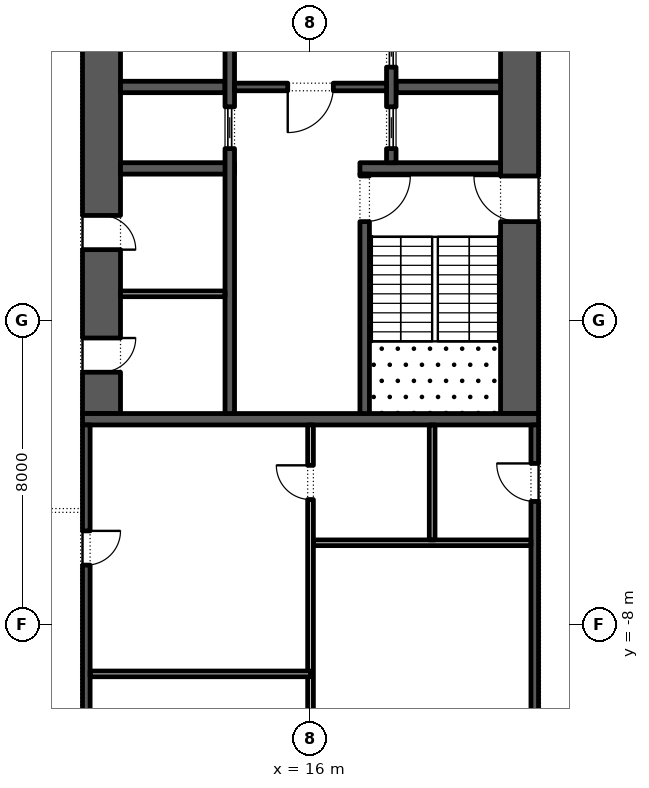
"""IFC4 building model, lengths in metres.
Left out: names, types, materials, properties, quantities, classifications, styles, units other than length and angle.
Written with IfcOpenShell. Run it as: python <this file> out.ifc"""

import sys

from ifc_helpers import new_model, si_unit, direction, frame, frame_2d, origin, place, context, subcontext, project, spatial, rectangle, extrude, element, fill, save


model = new_model("IFC4")
c1 = context("Model", 3, precision=1e-05, world=origin(), true_north=direction((0.0, 1.0)))
c2 = subcontext(c1, "Body", "Model", "MODEL_VIEW")
j1 = project(units=[si_unit("LENGTHUNIT", "METRE"), si_unit("PLANEANGLEUNIT", "RADIAN")], contexts=[c1])
p1 = place(None, origin())
s1 = spatial("IfcSite", under=j1, at=p1, CompositionType="ELEMENT")
p2 = place(p1, origin())
s2 = spatial("IfcBuilding", under=s1, at=p2, CompositionType="ELEMENT")
p3 = place(p2, frame((0.0, 0.0, 85.8)))
s3 = spatial("IfcBuildingStorey", under=s2, at=p3, CompositionType="ELEMENT", Elevation=85.8)
p4 = place(p3, frame((21.5, -2.45, 0.0), z_axis=(0.0, 0.0, 1.0), x_axis=(0.0, 1.0, 0.0)))
e1 = element("IfcWall", 1, at=p4, inside=s3, PredefinedType="SHEAR", context=c2, shape_type="SweptSolid", body=[
    extrude(rectangle(XDim=27.9, YDim=1.0, at=frame_2d((13.95, 0.0))), origin(), (0.0, 0.0, 1.0), 3.95),
])
p5 = place(p4, frame((5.05, 0.0, 0.0)))
e2 = element("IfcOpeningElement", 2, at=p5, cuts=e1, PredefinedType="OPENING", context=c2, shape_type="SweptSolid", body=[
    extrude(rectangle(XDim=1.2, YDim=2.1, at=frame_2d((0.6, 1.05))), frame((0.0, 0.51, 0.0), z_axis=(0.0, -1.0, 0.0), x_axis=(1.0, 0.0, 0.0)), (0.0, 0.0, 1.0), 1.02),
])
p6 = place(p4, frame((21.65, 0.0, 0.0)))
e3 = element("IfcOpeningElement", 3, at=p6, cuts=e1, PredefinedType="OPENING", context=c2, shape_type="SweptSolid", body=[
    extrude(rectangle(XDim=1.2, YDim=2.1, at=frame_2d((0.6, 1.05))), frame((0.0, 0.51, 0.0), z_axis=(0.0, -1.0, 0.0), x_axis=(1.0, 0.0, 0.0)), (0.0, 0.0, 1.0), 1.02),
])
p7 = place(p3, frame((10.5, -2.45, 0.0), z_axis=(0.0, 0.0, 1.0), x_axis=(0.0, 1.0, 0.0)))
e4 = element("IfcWall", 4, at=p7, inside=s3, PredefinedType="SHEAR", context=c2, shape_type="SweptSolid", body=[
    extrude(rectangle(XDim=27.9, YDim=1.0, at=frame_2d((13.95, 0.0))), origin(), (0.0, 0.0, 1.0), 3.95),
])
p8 = place(p7, frame((23.65, 0.0, 0.0)))
e5 = element("IfcOpeningElement", 5, at=p8, cuts=e4, PredefinedType="OPENING", context=c2, shape_type="SweptSolid", body=[
    extrude(rectangle(XDim=2.4, YDim=2.1, at=frame_2d((1.2, 1.05))), frame((0.0, 0.51, 0.0), z_axis=(0.0, -1.0, 0.0), x_axis=(1.0, 0.0, 0.0)), (0.0, 0.0, 1.0), 1.02),
])
p9 = place(p7, frame((1.087, 0.0, 0.0)))
e6 = element("IfcOpeningElement", 6, at=p9, cuts=e4, PredefinedType="OPENING", context=c2, shape_type="SweptSolid", body=[
    extrude(rectangle(XDim=0.9, YDim=2.1, at=frame_2d((0.45, 1.05))), frame((0.0, 0.51, 0.0), z_axis=(0.0, -1.0, 0.0), x_axis=(1.0, 0.0, 0.0)), (0.0, 0.0, 1.0), 1.02),
])
p10 = place(p7, frame((4.312, 0.0, 0.0)))
e7 = element("IfcOpeningElement", 7, at=p10, cuts=e4, PredefinedType="OPENING", context=c2, shape_type="SweptSolid", body=[
    extrude(rectangle(XDim=0.9, YDim=2.1, at=frame_2d((0.45, 1.05))), frame((0.0, 0.51, 0.0), z_axis=(0.0, -1.0, 0.0), x_axis=(1.0, 0.0, 0.0)), (0.0, 0.0, 1.0), 1.02),
])
p11 = place(p3, frame((10.0, -2.6, 0.0), z_axis=(0.0, 0.0, 1.0), x_axis=(1.0, 0.0, 0.0)))
e8 = element("IfcWall", 8, at=p11, inside=s3, PredefinedType="SHEAR", context=c2, shape_type="SweptSolid", body=[
    extrude(rectangle(XDim=12.0, YDim=0.3, at=frame_2d((6.0, 0.0))), origin(), (0.0, 0.0, 1.0), 3.95),
])
p12 = place(p3, frame((17.3, 4.0, 0.0), z_axis=(0.0, 0.0, 1.0), x_axis=(1.0, 0.0, 0.0)))
e9 = element("IfcWall", 9, at=p12, inside=s3, PredefinedType="SHEAR", context=c2, shape_type="SweptSolid", body=[
    extrude(rectangle(XDim=3.7, YDim=0.3, at=frame_2d((1.85, 0.0))), origin(), (0.0, 0.0, 1.0), 3.95),
])
p13 = place(p3, frame((17.425, -2.45, 0.0), z_axis=(0.0, 0.0, 1.0), x_axis=(0.0, 1.0, 0.0)))
e10 = element("IfcWall", 10, at=p13, inside=s3, PredefinedType="SHEAR", context=c2, shape_type="SweptSolid", body=[
    extrude(rectangle(XDim=6.3, YDim=0.25, at=frame_2d((3.15, 0.0))), origin(), (0.0, 0.0, 1.0), 3.95),
])
p14 = place(p13, frame((5.05, 0.0, 0.0)))
e11 = element("IfcOpeningElement", 11, at=p14, cuts=e10, PredefinedType="OPENING", context=c2, shape_type="SweptSolid", body=[
    extrude(rectangle(XDim=1.2, YDim=2.1, at=frame_2d((0.6, 1.05))), frame((0.0, 0.135, 0.0), z_axis=(0.0, -1.0, 0.0), x_axis=(1.0, 0.0, 0.0)), (0.0, 0.0, 1.0), 0.27),
])
p15 = place(p3, frame((18.25, 6.143, 0.0), z_axis=(0.0, 0.0, 1.0), x_axis=(1.0, 0.0, 0.0)))
e12 = element("IfcWall", 12, at=p15, inside=s3, PredefinedType="SHEAR", context=c2, shape_type="SweptSolid", body=[
    extrude(rectangle(XDim=2.75, YDim=0.3, at=frame_2d((1.375, 0.0))), origin(), (0.0, 0.0, 1.0), 3.95),
])
p16 = place(p3, frame((18.125, 4.15, 0.0), z_axis=(0.0, 0.0, 1.0), x_axis=(0.0, 1.0, 0.0)))
e13 = element("IfcWall", 13, at=p16, inside=s3, PredefinedType="SHEAR", context=c2, shape_type="SweptSolid", body=[
    extrude(rectangle(XDim=14.7, YDim=0.25, at=frame_2d((7.35, 0.0))), origin(), (0.0, 0.0, 1.0), 3.95),
])
p17 = place(p16, frame((0.371, 0.0, 0.0)))
e14 = element("IfcOpeningElement", 14, at=p17, cuts=e13, PredefinedType="OPENING", context=c2, shape_type="SweptSolid", body=[
    extrude(rectangle(XDim=1.1, YDim=2.1, at=frame_2d((0.55, 1.05))), frame((0.0, 0.135, 0.0), z_axis=(0.0, -1.0, 0.0), x_axis=(1.0, 0.0, 0.0)), (0.0, 0.0, 1.0), 0.27),
])
p18 = place(p16, frame((2.514, 0.0, 0.0)))
e15 = element("IfcOpeningElement", 15, at=p18, cuts=e13, PredefinedType="OPENING", context=c2, shape_type="SweptSolid", body=[
    extrude(rectangle(XDim=1.1, YDim=2.1, at=frame_2d((0.55, 1.05))), frame((0.0, 0.135, 0.0), z_axis=(0.0, -1.0, 0.0), x_axis=(1.0, 0.0, 0.0)), (0.0, 0.0, 1.0), 0.27),
])
p19 = place(p16, frame((4.657, 0.0, 0.0)))
e16 = element("IfcOpeningElement", 16, at=p19, cuts=e13, PredefinedType="OPENING", context=c2, shape_type="SweptSolid", body=[
    extrude(rectangle(XDim=1.1, YDim=2.1, at=frame_2d((0.55, 1.05))), frame((0.0, 0.135, 0.0), z_axis=(0.0, -1.0, 0.0), x_axis=(1.0, 0.0, 0.0)), (0.0, 0.0, 1.0), 0.27),
])
p20 = place(p16, frame((6.8, 0.0, 0.0)))
e17 = element("IfcOpeningElement", 17, at=p20, cuts=e13, PredefinedType="OPENING", context=c2, shape_type="SweptSolid", body=[
    extrude(rectangle(XDim=1.1, YDim=2.1, at=frame_2d((0.55, 1.05))), frame((0.0, 0.135, 0.0), z_axis=(0.0, -1.0, 0.0), x_axis=(1.0, 0.0, 0.0)), (0.0, 0.0, 1.0), 0.27),
])
p21 = place(p16, frame((8.943, 0.0, 0.0)))
e18 = element("IfcOpeningElement", 18, at=p21, cuts=e13, PredefinedType="OPENING", context=c2, shape_type="SweptSolid", body=[
    extrude(rectangle(XDim=1.1, YDim=2.1, at=frame_2d((0.55, 1.05))), frame((0.0, 0.135, 0.0), z_axis=(0.0, -1.0, 0.0), x_axis=(1.0, 0.0, 0.0)), (0.0, 0.0, 1.0), 0.27),
])
p22 = place(p16, frame((11.086, 0.0, 0.0)))
e19 = element("IfcOpeningElement", 19, at=p22, cuts=e13, PredefinedType="OPENING", context=c2, shape_type="SweptSolid", body=[
    extrude(rectangle(XDim=1.1, YDim=2.1, at=frame_2d((0.55, 1.05))), frame((0.0, 0.135, 0.0), z_axis=(0.0, -1.0, 0.0), x_axis=(1.0, 0.0, 0.0)), (0.0, 0.0, 1.0), 0.27),
])
p23 = place(p16, frame((13.229, 0.0, 0.0)))
e20 = element("IfcOpeningElement", 20, at=p23, cuts=e13, PredefinedType="OPENING", context=c2, shape_type="SweptSolid", body=[
    extrude(rectangle(XDim=1.1, YDim=2.1, at=frame_2d((0.55, 1.05))), frame((0.0, 0.135, 0.0), z_axis=(0.0, -1.0, 0.0), x_axis=(1.0, 0.0, 0.0)), (0.0, 0.0, 1.0), 0.27),
])
p24 = place(p3, frame((11.0, 4.0, 0.0), z_axis=(0.0, 0.0, 1.0), x_axis=(1.0, 0.0, 0.0)))
e21 = element("IfcWall", 21, at=p24, inside=s3, PredefinedType="SHEAR", context=c2, shape_type="SweptSolid", body=[
    extrude(rectangle(XDim=3.0, YDim=0.3, at=frame_2d((1.5, 0.0))), origin(), (0.0, 0.0, 1.0), 3.95),
])
p25 = place(p3, frame((11.0, 6.143, 0.0), z_axis=(0.0, 0.0, 1.0), x_axis=(1.0, 0.0, 0.0)))
e22 = element("IfcWall", 22, at=p25, inside=s3, PredefinedType="SHEAR", context=c2, shape_type="SweptSolid", body=[
    extrude(rectangle(XDim=2.75, YDim=0.3, at=frame_2d((1.375, 0.0))), origin(), (0.0, 0.0, 1.0), 3.95),
])
p26 = place(p3, frame((13.875, -2.45, 0.0), z_axis=(0.0, 0.0, 1.0), x_axis=(0.0, 1.0, 0.0)))
e23 = element("IfcWall", 23, at=p26, inside=s3, PredefinedType="SHEAR", context=c2, shape_type="SweptSolid", body=[
    extrude(rectangle(XDim=21.3, YDim=0.25, at=frame_2d((10.65, 0.0))), origin(), (0.0, 0.0, 1.0), 3.95),
])
p27 = place(p26, frame((14.571, 0.0, 0.0)))
e24 = element("IfcOpeningElement", 24, at=p27, cuts=e23, PredefinedType="OPENING", context=c2, shape_type="SweptSolid", body=[
    extrude(rectangle(XDim=0.9, YDim=2.1, at=frame_2d((0.45, 1.05))), frame((0.0, 0.135, 0.0), z_axis=(0.0, -1.0, 0.0), x_axis=(1.0, 0.0, 0.0)), (0.0, 0.0, 1.0), 0.27),
])
p28 = place(p26, frame((6.971, 0.0, 0.0)))
e25 = element("IfcOpeningElement", 25, at=p28, cuts=e23, PredefinedType="OPENING", context=c2, shape_type="SweptSolid", body=[
    extrude(rectangle(XDim=1.1, YDim=2.1, at=frame_2d((0.55, 1.05))), frame((0.0, 0.135, 0.0), z_axis=(0.0, -1.0, 0.0), x_axis=(1.0, 0.0, 0.0)), (0.0, 0.0, 1.0), 0.27),
])
p29 = place(p3, frame((14.0, 6.143, 0.0), z_axis=(0.0, 0.0, 1.0), x_axis=(1.0, 0.0, 0.0)))
e26 = element("IfcWall", 26, at=p29, inside=s3, PredefinedType="SHEAR", context=c2, shape_type="SweptSolid", body=[
    extrude(rectangle(XDim=4.0, YDim=0.2, at=frame_2d((2.0, 0.0))), origin(), (0.0, 0.0, 1.0), 3.95),
])
p30 = place(p29, frame((1.4, 0.0, 0.0)))
e27 = element("IfcOpeningElement", 27, at=p30, cuts=e26, PredefinedType="OPENING", context=c2, shape_type="SweptSolid", body=[
    extrude(rectangle(XDim=1.2, YDim=2.1, at=frame_2d((0.6, 1.05))), frame((0.0, 0.11, 0.0), z_axis=(0.0, -1.0, 0.0), x_axis=(1.0, 0.0, 0.0)), (0.0, 0.0, 1.0), 0.22),
])
p31 = place(p3, frame((11.0, 0.7, 0.0), z_axis=(0.0, 0.0, 1.0), x_axis=(1.0, 0.0, 0.0)))
e28 = element("IfcWall", 28, at=p31, inside=s3, PredefinedType="PARTITIONING", context=c2, shape_type="SweptSolid", body=[
    extrude(rectangle(XDim=2.75, YDim=0.15, at=frame_2d((1.375, 0.0))), origin(), (0.0, 0.0, 1.0), 3.95),
])
p32 = place(p3, frame((21.9, -15.8, 0.0), z_axis=(0.0, 0.0, 1.0), x_axis=(0.0, 1.0, 0.0)))
e29 = element("IfcWall", 29, at=p32, inside=s3, PredefinedType="SHEAR", context=c2, shape_type="SweptSolid", body=[
    extrude(rectangle(XDim=13.05, YDim=0.2, at=frame_2d((6.525, 0.0))), origin(), (0.0, 0.0, 1.0), 3.95),
])
p33 = place(p32, frame((4.488, 0.0, 0.0)))
e30 = element("IfcOpeningElement", 30, at=p33, cuts=e29, PredefinedType="OPENING", context=c2, shape_type="SweptSolid", body=[
    extrude(rectangle(XDim=0.9, YDim=2.1, at=frame_2d((0.45, 1.05))), frame((0.0, 0.11, 0.0), z_axis=(0.0, -1.0, 0.0), x_axis=(1.0, 0.0, 0.0)), (0.0, 0.0, 1.0), 0.22),
])
p34 = place(p32, frame((11.038, 0.0, 0.0)))
e31 = element("IfcOpeningElement", 31, at=p34, cuts=e29, PredefinedType="OPENING", context=c2, shape_type="SweptSolid", body=[
    extrude(rectangle(XDim=1.0, YDim=2.1, at=frame_2d((0.5, 1.05))), frame((0.0, 0.11, 0.0), z_axis=(0.0, -1.0, 0.0), x_axis=(1.0, 0.0, 0.0)), (0.0, 0.0, 1.0), 0.22),
])
p35 = place(p3, frame((10.1, -15.8, 0.0), z_axis=(0.0, 0.0, 1.0), x_axis=(0.0, 1.0, 0.0)))
e32 = element("IfcWall", 32, at=p35, inside=s3, PredefinedType="SHEAR", context=c2, shape_type="SweptSolid", body=[
    extrude(rectangle(XDim=13.05, YDim=0.2, at=frame_2d((6.525, 0.0))), origin(), (0.0, 0.0, 1.0), 3.95),
])
p36 = place(p35, frame((2.762, 0.0, 0.0)))
e33 = element("IfcOpeningElement", 33, at=p36, cuts=e32, PredefinedType="OPENING", context=c2, shape_type="SweptSolid", body=[
    extrude(rectangle(XDim=0.9, YDim=2.1, at=frame_2d((0.45, 1.05))), frame((0.0, 0.11, 0.0), z_axis=(0.0, -1.0, 0.0), x_axis=(1.0, 0.0, 0.0)), (0.0, 0.0, 1.0), 0.22),
])
p37 = place(p35, frame((9.363, 0.0, 0.0)))
e34 = element("IfcOpeningElement", 34, at=p37, cuts=e32, PredefinedType="OPENING", context=c2, shape_type="SweptSolid", body=[
    extrude(rectangle(XDim=0.9, YDim=2.1, at=frame_2d((0.45, 1.05))), frame((0.0, 0.11, 0.0), z_axis=(0.0, -1.0, 0.0), x_axis=(1.0, 0.0, 0.0)), (0.0, 0.0, 1.0), 0.22),
])
p38 = place(p3, frame((16.0, -15.8, 0.0), z_axis=(0.0, 0.0, 1.0), x_axis=(0.0, 1.0, 0.0)))
e35 = element("IfcWall", 35, at=p38, inside=s3, PredefinedType="PARTITIONING", context=c2, shape_type="SweptSolid", body=[
    extrude(rectangle(XDim=13.05, YDim=0.15, at=frame_2d((6.525, 0.0))), origin(), (0.0, 0.0, 1.0), 3.95),
])
p39 = place(p38, frame((11.087, 0.0, 0.0)))
e36 = element("IfcOpeningElement", 36, at=p39, cuts=e35, PredefinedType="OPENING", context=c2, shape_type="SweptSolid", body=[
    extrude(rectangle(XDim=0.9, YDim=2.1, at=frame_2d((0.45, 1.05))), frame((0.0, 0.085, 0.0), z_axis=(0.0, -1.0, 0.0), x_axis=(1.0, 0.0, 0.0)), (0.0, 0.0, 1.0), 0.17),
])
p40 = place(p3, frame((10.2, -9.3, 0.0), z_axis=(0.0, 0.0, 1.0), x_axis=(1.0, 0.0, 0.0)))
e37 = element("IfcWall", 37, at=p40, inside=s3, PredefinedType="PARTITIONING", context=c2, shape_type="SweptSolid", body=[
    extrude(rectangle(XDim=5.8, YDim=0.15, at=frame_2d((2.9, 0.0))), origin(), (0.0, 0.0, 1.0), 3.95),
])
p41 = place(p3, frame((16.075, -5.85, 0.0), z_axis=(0.0, 0.0, 1.0), x_axis=(1.0, 0.0, 0.0)))
e38 = element("IfcWall", 38, at=p41, inside=s3, PredefinedType="PARTITIONING", context=c2, shape_type="SweptSolid", body=[
    extrude(rectangle(XDim=5.725, YDim=0.15, at=frame_2d((2.863, 0.0))), origin(), (0.0, 0.0, 1.0), 3.95),
])
p42 = place(p3, frame((19.2, -5.775, 0.0), z_axis=(0.0, 0.0, 1.0), x_axis=(0.0, 1.0, 0.0)))
e39 = element("IfcWall", 39, at=p42, inside=s3, PredefinedType="PARTITIONING", context=c2, shape_type="SweptSolid", body=[
    extrude(rectangle(XDim=3.025, YDim=0.15, at=frame_2d((1.512, 0.0))), origin(), (0.0, 0.0, 1.0), 3.95),
])
p43 = place(p17, origin())
e40 = element("IfcDoor", 40, at=p43, inside=s3, OperationType="SLIDING_TO_LEFT", PredefinedType="DOOR", context=c2, shape_type="SweptSolid", body=[
    extrude(rectangle(XDim=1.1, YDim=2.1, at=frame_2d((0.55, 1.05))), frame((0.0, 0.025, 0.0), z_axis=(0.0, -1.0, 0.0), x_axis=(1.0, 0.0, 0.0)), (0.0, 0.0, 1.0), 0.05),
])
fill(e14, e40)
p44 = place(p18, origin())
e41 = element("IfcDoor", 41, at=p44, inside=s3, OperationType="SLIDING_TO_LEFT", PredefinedType="DOOR", context=c2, shape_type="SweptSolid", body=[
    extrude(rectangle(XDim=1.1, YDim=2.1, at=frame_2d((0.55, 1.05))), frame((0.0, 0.025, 0.0), z_axis=(0.0, -1.0, 0.0), x_axis=(1.0, 0.0, 0.0)), (0.0, 0.0, 1.0), 0.05),
])
fill(e15, e41)
p45 = place(p28, origin())
e42 = element("IfcDoor", 42, at=p45, inside=s3, OperationType="SLIDING_TO_LEFT", PredefinedType="DOOR", context=c2, shape_type="SweptSolid", body=[
    extrude(rectangle(XDim=1.1, YDim=2.1, at=frame_2d((0.55, 1.05))), frame((0.0, 0.025, 0.0), z_axis=(0.0, -1.0, 0.0), x_axis=(1.0, 0.0, 0.0)), (0.0, 0.0, 1.0), 0.05),
])
fill(e25, e42)
p46 = place(p30, frame((1.2, 0.0, 0.0), z_axis=(0.0, 0.0, 1.0), x_axis=(-1.0, 0.0, 0.0)))
e43 = element("IfcDoor", 43, at=p46, inside=s3, OperationType="SINGLE_SWING_LEFT", PredefinedType="DOOR", context=c2, shape_type="SweptSolid", body=[
    extrude(rectangle(XDim=1.2, YDim=2.1, at=frame_2d((0.6, 1.05))), frame((0.0, 0.025, 0.0), z_axis=(0.0, -1.0, 0.0), x_axis=(1.0, 0.0, 0.0)), (0.0, 0.0, 1.0), 0.05),
])
fill(e27, e43)
p47 = place(p14, frame((1.2, 0.0, 0.0), z_axis=(0.0, 0.0, 1.0), x_axis=(-1.0, 0.0, 0.0)))
e44 = element("IfcDoor", 44, at=p47, inside=s3, OperationType="SINGLE_SWING_RIGHT", PredefinedType="DOOR", context=c2, shape_type="SweptSolid", body=[
    extrude(rectangle(XDim=1.2, YDim=2.1, at=frame_2d((0.6, 1.05))), frame((0.0, 0.025, 0.0), z_axis=(0.0, -1.0, 0.0), x_axis=(1.0, 0.0, 0.0)), (0.0, 0.0, 1.0), 0.05),
])
fill(e11, e44)
p48 = place(p5, origin())
e45 = element("IfcDoor", 45, at=p48, inside=s3, OperationType="SINGLE_SWING_LEFT", PredefinedType="DOOR", context=c2, shape_type="SweptSolid", body=[
    extrude(rectangle(XDim=1.2, YDim=2.1, at=frame_2d((0.6, 1.05))), frame((0.0, 0.025, 0.0), z_axis=(0.0, -1.0, 0.0), x_axis=(1.0, 0.0, 0.0)), (0.0, 0.0, 1.0), 0.05),
])
fill(e2, e45)
p49 = place(p9, frame((0.9, -0.95, 0.0), z_axis=(0.0, 0.0, 1.0), x_axis=(-1.0, 0.0, 0.0)))
e46 = element("IfcDoor", 46, at=p49, inside=s3, OperationType="SINGLE_SWING_RIGHT", PredefinedType="DOOR", context=c2, shape_type="SweptSolid", body=[
    extrude(rectangle(XDim=0.9, YDim=2.1, at=frame_2d((0.45, 1.05))), frame((0.0, -0.45, 0.0), z_axis=(0.0, -1.0, 0.0), x_axis=(1.0, 0.0, 0.0)), (0.0, 0.0, 1.0), 0.05),
])
fill(e6, e46)
p50 = place(p10, frame((0.9, -0.95, 0.0), z_axis=(0.0, 0.0, 1.0), x_axis=(-1.0, 0.0, 0.0)))
e47 = element("IfcDoor", 47, at=p50, inside=s3, OperationType="SINGLE_SWING_LEFT", PredefinedType="DOOR", context=c2, shape_type="SweptSolid", body=[
    extrude(rectangle(XDim=0.9, YDim=2.1, at=frame_2d((0.45, 1.05))), frame((0.0, -0.45, 0.0), z_axis=(0.0, -1.0, 0.0), x_axis=(1.0, 0.0, 0.0)), (0.0, 0.0, 1.0), 0.05),
])
fill(e7, e47)
p51 = place(p34, origin())
e48 = element("IfcDoor", 48, at=p51, inside=s3, OperationType="SINGLE_SWING_LEFT", PredefinedType="DOOR", context=c2, shape_type="SweptSolid", body=[
    extrude(rectangle(XDim=1.0, YDim=2.1, at=frame_2d((0.5, 1.05))), frame((0.0, 0.1, 0.0), z_axis=(0.0, -1.0, 0.0), x_axis=(1.0, 0.0, 0.0)), (0.0, 0.0, 1.0), 0.05),
])
fill(e31, e48)
p52 = place(p39, origin())
e49 = element("IfcDoor", 49, at=p52, inside=s3, OperationType="SINGLE_SWING_LEFT", PredefinedType="DOOR", context=c2, shape_type="SweptSolid", body=[
    extrude(rectangle(XDim=0.9, YDim=2.1, at=frame_2d((0.45, 1.05))), frame((0.0, 0.025, 0.0), z_axis=(0.0, -1.0, 0.0), x_axis=(1.0, 0.0, 0.0)), (0.0, 0.0, 1.0), 0.05),
])
fill(e36, e49)
p53 = place(p37, frame((0.9, -0.15, 0.0), z_axis=(0.0, 0.0, 1.0), x_axis=(-1.0, 0.0, 0.0)))
e50 = element("IfcDoor", 50, at=p53, inside=s3, OperationType="SINGLE_SWING_RIGHT", PredefinedType="DOOR", context=c2, shape_type="SweptSolid", body=[
    extrude(rectangle(XDim=0.9, YDim=2.1, at=frame_2d((0.45, 1.05))), frame((0.0, -0.05, 0.0), z_axis=(0.0, -1.0, 0.0), x_axis=(1.0, 0.0, 0.0)), (0.0, 0.0, 1.0), 0.05),
])
fill(e34, e50)
save(model, sys.argv[1])
